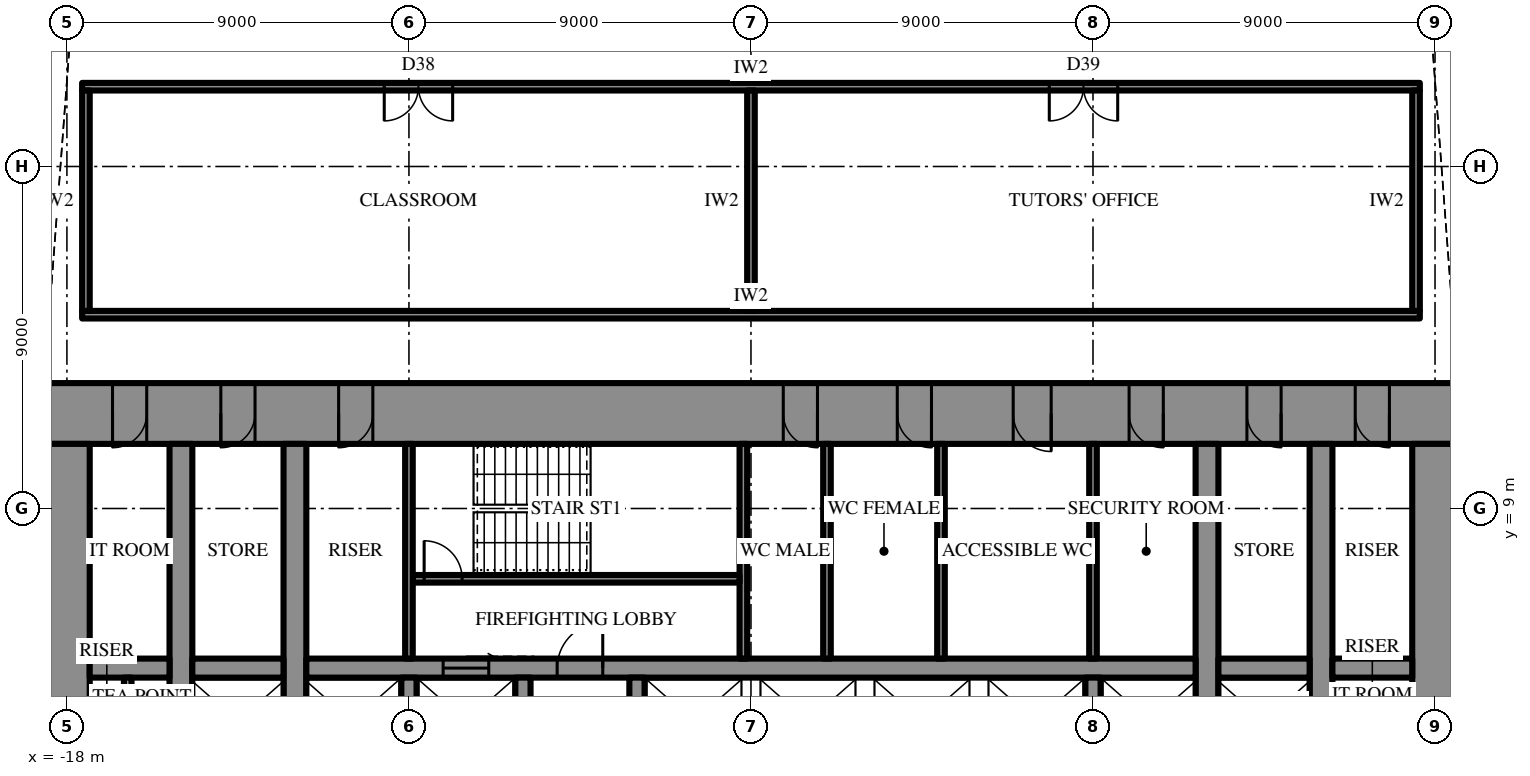
"""IFC4 building model, lengths in metres.
Left out: names, types, materials, properties, quantities, classifications, styles, units other than length and angle.
Written with IfcOpenShell. Run it as: python <this file> out.ifc"""

import sys

from ifc_helpers import new_model, si_unit, direction, frame, frame_2d, origin, place, context, subcontext, project, spatial, rectangle, extrude, element, fill, save


model = new_model("IFC4")
c1 = context("Model", 3, precision=1e-05, world=origin(), true_north=direction((0.0, 1.0)))
c2 = subcontext(c1, "Body", "Model", "MODEL_VIEW")
j1 = project(units=[si_unit("LENGTHUNIT", "METRE"), si_unit("PLANEANGLEUNIT", "RADIAN")], contexts=[c1])
p1 = place(None, origin())
s1 = spatial("IfcSite", under=j1, at=p1, CompositionType="ELEMENT")
p2 = place(p1, origin())
s2 = spatial("IfcBuilding", under=s1, at=p2, CompositionType="ELEMENT")
p3 = place(p2, frame((0.0, 0.0, 119.5)))
s3 = spatial("IfcBuildingStorey", under=s2, at=p3, CompositionType="ELEMENT", Elevation=119.5)
p4 = place(p3, frame((-18.6, 11.5, 0.0), z_axis=(0.0, 0.0, 1.0), x_axis=(1.0, 0.0, 0.0)))
e1 = element("IfcWall", 1, at=p4, inside=s3, PredefinedType="SHEAR", context=c2, shape_type="SweptSolid", body=[
    extrude(rectangle(XDim=37.2, YDim=1.6, at=frame_2d((18.6, 0.0))), origin(), (0.0, 0.0, 1.0), 4.2),
])
p5 = place(p4, frame((19.45, 0.0, 0.0)))
e2 = element("IfcOpeningElement", 2, at=p5, cuts=e1, PredefinedType="OPENING", context=c2, shape_type="SweptSolid", body=[
    extrude(rectangle(XDim=0.9, YDim=2.2, at=frame_2d((0.45, 1.1))), frame((0.0, 0.81, 0.0), z_axis=(0.0, -1.0, 0.0), x_axis=(1.0, 0.0, 0.0)), (0.0, 0.0, 1.0), 1.62),
])
p6 = place(p4, frame((22.45, 0.0, 0.0)))
e3 = element("IfcOpeningElement", 3, at=p6, cuts=e1, PredefinedType="OPENING", context=c2, shape_type="SweptSolid", body=[
    extrude(rectangle(XDim=0.9, YDim=2.2, at=frame_2d((0.45, 1.1))), frame((0.0, 0.81, 0.0), z_axis=(0.0, -1.0, 0.0), x_axis=(1.0, 0.0, 0.0)), (0.0, 0.0, 1.0), 1.62),
])
p7 = place(p4, frame((25.5, 0.0, 0.0)))
e4 = element("IfcOpeningElement", 4, at=p7, cuts=e1, PredefinedType="OPENING", context=c2, shape_type="SweptSolid", body=[
    extrude(rectangle(XDim=1.0, YDim=2.2, at=frame_2d((0.5, 1.1))), frame((0.0, 0.81, 0.0), z_axis=(0.0, -1.0, 0.0), x_axis=(1.0, 0.0, 0.0)), (0.0, 0.0, 1.0), 1.62),
])
p8 = place(p4, frame((1.8, 0.0, 0.0)))
e5 = element("IfcOpeningElement", 5, at=p8, cuts=e1, PredefinedType="OPENING", context=c2, shape_type="SweptSolid", body=[
    extrude(rectangle(XDim=0.9, YDim=2.2, at=frame_2d((0.45, 1.1))), frame((0.0, 0.81, 0.0), z_axis=(0.0, -1.0, 0.0), x_axis=(1.0, 0.0, 0.0)), (0.0, 0.0, 1.0), 1.62),
])
p9 = place(p4, frame((4.65, 0.0, 0.0)))
e6 = element("IfcOpeningElement", 6, at=p9, cuts=e1, PredefinedType="OPENING", context=c2, shape_type="SweptSolid", body=[
    extrude(rectangle(XDim=0.9, YDim=2.2, at=frame_2d((0.45, 1.1))), frame((0.0, 0.81, 0.0), z_axis=(0.0, -1.0, 0.0), x_axis=(1.0, 0.0, 0.0)), (0.0, 0.0, 1.0), 1.62),
])
p10 = place(p4, frame((7.75, 0.0, 0.0)))
e7 = element("IfcOpeningElement", 7, at=p10, cuts=e1, PredefinedType="OPENING", context=c2, shape_type="SweptSolid", body=[
    extrude(rectangle(XDim=0.9, YDim=2.2, at=frame_2d((0.45, 1.1))), frame((0.0, 0.81, 0.0), z_axis=(0.0, -1.0, 0.0), x_axis=(1.0, 0.0, 0.0)), (0.0, 0.0, 1.0), 1.62),
])
p11 = place(p4, frame((28.55, 0.0, 0.0)))
e8 = element("IfcOpeningElement", 8, at=p11, cuts=e1, PredefinedType="OPENING", context=c2, shape_type="SweptSolid", body=[
    extrude(rectangle(XDim=0.9, YDim=2.2, at=frame_2d((0.45, 1.1))), frame((0.0, 0.81, 0.0), z_axis=(0.0, -1.0, 0.0), x_axis=(1.0, 0.0, 0.0)), (0.0, 0.0, 1.0), 1.62),
])
p12 = place(p4, frame((31.65, 0.0, 0.0)))
e9 = element("IfcOpeningElement", 9, at=p12, cuts=e1, PredefinedType="OPENING", context=c2, shape_type="SweptSolid", body=[
    extrude(rectangle(XDim=0.9, YDim=2.2, at=frame_2d((0.45, 1.1))), frame((0.0, 0.81, 0.0), z_axis=(0.0, -1.0, 0.0), x_axis=(1.0, 0.0, 0.0)), (0.0, 0.0, 1.0), 1.62),
])
p13 = place(p4, frame((34.5, 0.0, 0.0)))
e10 = element("IfcOpeningElement", 10, at=p13, cuts=e1, PredefinedType="OPENING", context=c2, shape_type="SweptSolid", body=[
    extrude(rectangle(XDim=0.9, YDim=2.2, at=frame_2d((0.45, 1.1))), frame((0.0, 0.81, 0.0), z_axis=(0.0, -1.0, 0.0), x_axis=(1.0, 0.0, 0.0)), (0.0, 0.0, 1.0), 1.62),
])
p14 = place(p3, frame((18.0, -10.7, 0.0), z_axis=(0.0, 0.0, 1.0), x_axis=(0.0, 1.0, 0.0)))
e11 = element("IfcWall", 11, at=p14, inside=s3, PredefinedType="SHEAR", context=c2, shape_type="SweptSolid", body=[
    extrude(rectangle(XDim=21.4, YDim=1.2, at=frame_2d((10.7, 0.0))), origin(), (0.0, 0.0, 1.0), 4.2),
])
p15 = place(p14, frame((9.8, 0.0, 0.0)))
e12 = element("IfcOpeningElement", 12, at=p15, cuts=e11, PredefinedType="OPENING", context=c2, shape_type="SweptSolid", body=[
    extrude(rectangle(XDim=1.8, YDim=2.4, at=frame_2d((0.9, 1.2))), frame((0.0, 0.61, 0.0), z_axis=(0.0, -1.0, 0.0), x_axis=(1.0, 0.0, 0.0)), (0.0, 0.0, 1.0), 1.22),
])
p16 = place(p3, frame((-18.0, 10.7, 0.0), z_axis=(0.0, 0.0, 1.0), x_axis=(0.0, -1.0, 0.0)))
e13 = element("IfcWall", 13, at=p16, inside=s3, PredefinedType="SHEAR", context=c2, shape_type="SweptSolid", body=[
    extrude(rectangle(XDim=21.4, YDim=1.2, at=frame_2d((10.7, 0.0))), origin(), (0.0, 0.0, 1.0), 4.2),
])
p17 = place(p16, frame((9.8, 0.0, 0.0)))
e14 = element("IfcOpeningElement", 14, at=p17, cuts=e13, PredefinedType="OPENING", context=c2, shape_type="SweptSolid", body=[
    extrude(rectangle(XDim=1.8, YDim=2.4, at=frame_2d((0.9, 1.2))), frame((0.0, 0.61, 0.0), z_axis=(0.0, -1.0, 0.0), x_axis=(1.0, 0.0, 0.0)), (0.0, 0.0, 1.0), 1.22),
])
p18 = place(p3, frame((12.0, -10.7, 0.0), z_axis=(0.0, 0.0, 1.0), x_axis=(0.0, 1.0, 0.0)))
e15 = element("IfcWall", 15, at=p18, inside=s3, PredefinedType="SHEAR", context=c2, shape_type="SweptSolid", body=[
    extrude(rectangle(XDim=21.4, YDim=0.6, at=frame_2d((10.7, 0.0))), origin(), (0.0, 0.0, 1.0), 4.2),
])
p19 = place(p18, frame((9.8, 0.0, 0.0)))
e16 = element("IfcOpeningElement", 16, at=p19, cuts=e15, PredefinedType="OPENING", context=c2, shape_type="SweptSolid", body=[
    extrude(rectangle(XDim=1.8, YDim=2.4, at=frame_2d((0.9, 1.2))), frame((0.0, 0.31, 0.0), z_axis=(0.0, -1.0, 0.0), x_axis=(1.0, 0.0, 0.0)), (0.0, 0.0, 1.0), 0.62),
])
p20 = place(p3, frame((-12.0, -10.7, 0.0), z_axis=(0.0, 0.0, 1.0), x_axis=(0.0, 1.0, 0.0)))
e17 = element("IfcWall", 17, at=p20, inside=s3, PredefinedType="SHEAR", context=c2, shape_type="SweptSolid", body=[
    extrude(rectangle(XDim=21.4, YDim=0.6, at=frame_2d((10.7, 0.0))), origin(), (0.0, 0.0, 1.0), 4.2),
])
p21 = place(p20, frame((9.8, 0.0, 0.0)))
e18 = element("IfcOpeningElement", 18, at=p21, cuts=e17, PredefinedType="OPENING", context=c2, shape_type="SweptSolid", body=[
    extrude(rectangle(XDim=1.8, YDim=2.4, at=frame_2d((0.9, 1.2))), frame((0.0, 0.31, 0.0), z_axis=(0.0, -1.0, 0.0), x_axis=(1.0, 0.0, 0.0)), (0.0, 0.0, 1.0), 0.62),
])
p22 = place(p3, frame((15.0, -10.7, 0.0), z_axis=(0.0, 0.0, 1.0), x_axis=(0.0, 1.0, 0.0)))
e19 = element("IfcWall", 19, at=p22, inside=s3, PredefinedType="SHEAR", context=c2, shape_type="SweptSolid", body=[
    extrude(rectangle(XDim=21.4, YDim=0.6, at=frame_2d((10.7, 0.0))), origin(), (0.0, 0.0, 1.0), 4.2),
])
p23 = place(p22, frame((9.8, 0.0, 0.0)))
e20 = element("IfcOpeningElement", 20, at=p23, cuts=e19, PredefinedType="OPENING", context=c2, shape_type="SweptSolid", body=[
    extrude(rectangle(XDim=1.8, YDim=2.4, at=frame_2d((0.9, 1.2))), frame((0.0, 0.31, 0.0), z_axis=(0.0, -1.0, 0.0), x_axis=(1.0, 0.0, 0.0)), (0.0, 0.0, 1.0), 0.62),
])
p24 = place(p3, frame((-15.0, -10.7, 0.0), z_axis=(0.0, 0.0, 1.0), x_axis=(0.0, 1.0, 0.0)))
e21 = element("IfcWall", 21, at=p24, inside=s3, PredefinedType="SHEAR", context=c2, shape_type="SweptSolid", body=[
    extrude(rectangle(XDim=21.4, YDim=0.6, at=frame_2d((10.7, 0.0))), origin(), (0.0, 0.0, 1.0), 4.2),
])
p25 = place(p24, frame((9.8, 0.0, 0.0)))
e22 = element("IfcOpeningElement", 22, at=p25, cuts=e21, PredefinedType="OPENING", context=c2, shape_type="SweptSolid", body=[
    extrude(rectangle(XDim=1.8, YDim=2.4, at=frame_2d((0.9, 1.2))), frame((0.0, 0.31, 0.0), z_axis=(0.0, -1.0, 0.0), x_axis=(1.0, 0.0, 0.0)), (0.0, 0.0, 1.0), 0.62),
])
p26 = place(p3, frame((-17.4, 4.8, 0.0), z_axis=(0.0, 0.0, 1.0), x_axis=(1.0, 0.0, 0.0)))
e23 = element("IfcWall", 23, at=p26, inside=s3, PredefinedType="SHEAR", context=c2, shape_type="SweptSolid", body=[
    extrude(rectangle(XDim=2.1, YDim=0.5, at=frame_2d((1.05, 0.0))), origin(), (0.0, 0.0, 1.0), 4.2),
])
p27 = place(p3, frame((-14.7, 4.8, 0.0), z_axis=(0.0, 0.0, 1.0), x_axis=(1.0, 0.0, 0.0)))
e24 = element("IfcWall", 24, at=p27, inside=s3, PredefinedType="SHEAR", context=c2, shape_type="SweptSolid", body=[
    extrude(rectangle(XDim=2.4, YDim=0.5, at=frame_2d((1.2, 0.0))), origin(), (0.0, 0.0, 1.0), 4.2),
])
p28 = place(p3, frame((-11.7, 4.8, 0.0), z_axis=(0.0, 0.0, 1.0), x_axis=(1.0, 0.0, 0.0)))
e25 = element("IfcWall", 25, at=p28, inside=s3, PredefinedType="SHEAR", context=c2, shape_type="SweptSolid", body=[
    extrude(rectangle(XDim=23.4, YDim=0.5, at=frame_2d((11.7, 0.0))), origin(), (0.0, 0.0, 1.0), 4.2),
])
p29 = place(p28, frame((6.6, 0.0, 0.0)))
e26 = element("IfcOpeningElement", 26, at=p29, cuts=e25, PredefinedType="OPENING", context=c2, shape_type="SweptSolid", body=[
    extrude(rectangle(XDim=1.2, YDim=2.2, at=frame_2d((0.6, 1.1))), frame((0.0, 0.26, 0.0), z_axis=(0.0, -1.0, 0.0), x_axis=(1.0, 0.0, 0.0)), (0.0, 0.0, 1.0), 0.52),
])
p30 = place(p28, frame((3.6, 0.0, 0.0)))
e27 = element("IfcOpeningElement", 27, at=p30, cuts=e25, PredefinedType="OPENING", context=c2, shape_type="SweptSolid", body=[
    extrude(rectangle(XDim=1.2, YDim=2.2, at=frame_2d((0.6, 1.1))), frame((0.0, 0.26, 0.0), z_axis=(0.0, -1.0, 0.0), x_axis=(1.0, 0.0, 0.0)), (0.0, 0.0, 1.0), 0.52),
])
p31 = place(p3, frame((12.3, 4.8, 0.0), z_axis=(0.0, 0.0, 1.0), x_axis=(1.0, 0.0, 0.0)))
e28 = element("IfcWall", 28, at=p31, inside=s3, PredefinedType="SHEAR", context=c2, shape_type="SweptSolid", body=[
    extrude(rectangle(XDim=2.4, YDim=0.5, at=frame_2d((1.2, 0.0))), origin(), (0.0, 0.0, 1.0), 4.2),
])
p32 = place(p3, frame((15.3, 4.8, 0.0), z_axis=(0.0, 0.0, 1.0), x_axis=(1.0, 0.0, 0.0)))
e29 = element("IfcWall", 29, at=p32, inside=s3, PredefinedType="SHEAR", context=c2, shape_type="SweptSolid", body=[
    extrude(rectangle(XDim=2.1, YDim=0.5, at=frame_2d((1.05, 0.0))), origin(), (0.0, 0.0, 1.0), 4.2),
])
for number, where, z_axis, x_axis in (
    (30, (-9.0, 2.25, 0.0), (0.0, 0.0, 1.0), (0.0, 1.0, 0.0)),
    (31, (-6.0, 2.25, 0.0), (0.0, 0.0, 1.0), (0.0, 1.0, 0.0)),
    (32, (-3.0, 2.25, 0.0), (0.0, 0.0, 1.0), (0.0, 1.0, 0.0)),
    (33, (9.0, 2.25, 0.0), (0.0, 0.0, 1.0), (0.0, 1.0, 0.0)),
):
    element("IfcWall", number, at=place(p3, frame(where, z_axis=z_axis, x_axis=x_axis)), inside=s3, PredefinedType="SHEAR", context=c2, shape_type="SweptSolid", body=[
        extrude(rectangle(XDim=2.3, YDim=0.4, at=frame_2d((1.15, 0.0))), origin(), (0.0, 0.0, 1.0), 4.2),
    ])
p33 = place(p3, frame((-0.2, 5.05, 0.0), z_axis=(0.0, 0.0, 1.0), x_axis=(0.0, 1.0, 0.0)))
e34 = element("IfcWall", 34, at=p33, inside=s3, PredefinedType="SHEAR", context=c2, shape_type="SweptSolid", body=[
    extrude(rectangle(XDim=5.65, YDim=0.2, at=frame_2d((2.825, 0.0))), origin(), (0.0, 0.0, 1.0), 4.2),
])
p34 = place(p3, frame((-8.9, 7.15, 0.0), z_axis=(0.0, 0.0, 1.0), x_axis=(1.0, 0.0, 0.0)))
e35 = element("IfcWall", 35, at=p34, inside=s3, PredefinedType="SHEAR", context=c2, shape_type="SweptSolid", body=[
    extrude(rectangle(XDim=8.6, YDim=0.2, at=frame_2d((4.3, 0.0))), origin(), (0.0, 0.0, 1.0), 4.2),
])
p35 = place(p34, frame((0.3, 0.0, 0.0)))
e36 = element("IfcOpeningElement", 36, at=p35, cuts=e35, PredefinedType="OPENING", context=c2, shape_type="SweptSolid", body=[
    extrude(rectangle(XDim=1.0, YDim=2.2, at=frame_2d((0.5, 1.1))), frame((0.0, 0.11, 0.0), z_axis=(0.0, -1.0, 0.0), x_axis=(1.0, 0.0, 0.0)), (0.0, 0.0, 1.0), 0.22),
])
for number, where, z_axis, x_axis in (
    (37, (-9.0, 5.05, 0.0), (0.0, 0.0, 1.0), (0.0, 1.0, 0.0)),
    (38, (9.0, 5.05, 0.0), (0.0, 0.0, 1.0), (0.0, 1.0, 0.0)),
    (39, (2.0, 5.05, 0.0), (0.0, 0.0, 1.0), (0.0, 1.0, 0.0)),
    (40, (5.0, 5.05, 0.0), (0.0, 0.0, 1.0), (0.0, 1.0, 0.0)),
):
    element("IfcWall", number, at=place(p3, frame(where, z_axis=z_axis, x_axis=x_axis)), inside=s3, PredefinedType="PARTITIONING", context=c2, shape_type="SweptSolid", body=[
        extrude(rectangle(XDim=5.65, YDim=0.2, at=frame_2d((2.825, 0.0))), origin(), (0.0, 0.0, 1.0), 4.0),
    ])
p36 = place(p3, frame((-16.4, 3.55, 0.0), z_axis=(0.0, 0.0, 1.0), x_axis=(0.0, 1.0, 0.0)))
e41 = element("IfcWall", 41, at=p36, inside=s3, PredefinedType="PARTITIONING", context=c2, shape_type="SweptSolid", body=[
    extrude(rectangle(XDim=1.0, YDim=0.2, at=frame_2d((0.5, 0.0))), origin(), (0.0, 0.0, 1.0), 4.0),
])
p37 = place(p3, frame((-17.6, 14.1, 0.0), z_axis=(0.0, 0.0, 1.0), x_axis=(1.0, 0.0, 0.0)))
e42 = element("IfcWall", 42, at=p37, inside=s3, PredefinedType="PARTITIONING", context=c2, shape_type="SweptSolid", body=[
    extrude(rectangle(XDim=35.2, YDim=0.2, at=frame_2d((17.6, 0.0))), origin(), (0.0, 0.0, 1.0), 4.0),
])
p38 = place(p3, frame((-17.6, 20.1, 0.0), z_axis=(0.0, 0.0, 1.0), x_axis=(1.0, 0.0, 0.0)))
e43 = element("IfcWall", 43, at=p38, inside=s3, PredefinedType="PARTITIONING", context=c2, shape_type="SweptSolid", body=[
    extrude(rectangle(XDim=35.2, YDim=0.2, at=frame_2d((17.6, 0.0))), origin(), (0.0, 0.0, 1.0), 4.0),
])
p39 = place(p38, frame((7.95, 0.0, 0.0)))
e44 = element("IfcOpeningElement", 44, at=p39, cuts=e43, PredefinedType="OPENING", context=c2, shape_type="SweptSolid", body=[
    extrude(rectangle(XDim=1.8, YDim=2.4, at=frame_2d((0.9, 1.2))), frame((0.0, 0.11, 0.0), z_axis=(0.0, -1.0, 0.0), x_axis=(1.0, 0.0, 0.0)), (0.0, 0.0, 1.0), 0.22),
])
p40 = place(p38, frame((25.45, 0.0, 0.0)))
e45 = element("IfcOpeningElement", 45, at=p40, cuts=e43, PredefinedType="OPENING", context=c2, shape_type="SweptSolid", body=[
    extrude(rectangle(XDim=1.8, YDim=2.4, at=frame_2d((0.9, 1.2))), frame((0.0, 0.11, 0.0), z_axis=(0.0, -1.0, 0.0), x_axis=(1.0, 0.0, 0.0)), (0.0, 0.0, 1.0), 0.22),
])
p41 = place(p3, frame((-17.5, 14.2, 0.0), z_axis=(0.0, 0.0, 1.0), x_axis=(0.0, 1.0, 0.0)))
e46 = element("IfcWall", 46, at=p41, inside=s3, PredefinedType="PARTITIONING", context=c2, shape_type="SweptSolid", body=[
    extrude(rectangle(XDim=5.8, YDim=0.2, at=frame_2d((2.9, 0.0))), origin(), (0.0, 0.0, 1.0), 4.0),
])
p42 = place(p3, frame((0.0, 14.2, 0.0), z_axis=(0.0, 0.0, 1.0), x_axis=(0.0, 1.0, 0.0)))
e47 = element("IfcWall", 47, at=p42, inside=s3, PredefinedType="PARTITIONING", context=c2, shape_type="SweptSolid", body=[
    extrude(rectangle(XDim=5.8, YDim=0.2, at=frame_2d((2.9, 0.0))), origin(), (0.0, 0.0, 1.0), 2.992),
])
p43 = place(p3, frame((17.5, 14.2, 0.0), z_axis=(0.0, 0.0, 1.0), x_axis=(0.0, 1.0, 0.0)))
e48 = element("IfcWall", 48, at=p43, inside=s3, PredefinedType="PARTITIONING", context=c2, shape_type="SweptSolid", body=[
    extrude(rectangle(XDim=5.8, YDim=0.2, at=frame_2d((2.9, 0.0))), origin(), (0.0, 0.0, 1.0), 4.0),
])
p44 = place(p29, origin())
e49 = element("IfcDoor", 49, at=p44, inside=s3, OperationType="SINGLE_SWING_LEFT", PredefinedType="DOOR", context=c2, shape_type="SweptSolid", body=[
    extrude(rectangle(XDim=1.2, YDim=2.2, at=frame_2d((0.6, 1.1))), frame((0.0, 0.025, 0.0), z_axis=(0.0, -1.0, 0.0), x_axis=(1.0, 0.0, 0.0)), (0.0, 0.0, 1.0), 0.05),
])
fill(e26, e49)
p45 = place(p35, origin())
e50 = element("IfcDoor", 50, at=p45, inside=s3, OperationType="SINGLE_SWING_RIGHT", PredefinedType="DOOR", context=c2, shape_type="SweptSolid", body=[
    extrude(rectangle(XDim=1.0, YDim=2.2, at=frame_2d((0.5, 1.1))), frame((0.0, 0.025, 0.0), z_axis=(0.0, -1.0, 0.0), x_axis=(1.0, 0.0, 0.0)), (0.0, 0.0, 1.0), 0.05),
])
fill(e36, e50)
p46 = place(p5, frame((0.9, 0.0, 0.0), z_axis=(0.0, 0.0, 1.0), x_axis=(-1.0, 0.0, 0.0)))
e51 = element("IfcDoor", 51, at=p46, inside=s3, OperationType="SINGLE_SWING_RIGHT", PredefinedType="DOOR", context=c2, shape_type="SweptSolid", body=[
    extrude(rectangle(XDim=0.9, YDim=2.2, at=frame_2d((0.45, 1.1))), frame((0.0, 0.025, 0.0), z_axis=(0.0, -1.0, 0.0), x_axis=(1.0, 0.0, 0.0)), (0.0, 0.0, 1.0), 0.05),
])
fill(e2, e51)
p47 = place(p6, frame((0.9, 0.0, 0.0), z_axis=(0.0, 0.0, 1.0), x_axis=(-1.0, 0.0, 0.0)))
e52 = element("IfcDoor", 52, at=p47, inside=s3, OperationType="SINGLE_SWING_RIGHT", PredefinedType="DOOR", context=c2, shape_type="SweptSolid", body=[
    extrude(rectangle(XDim=0.9, YDim=2.2, at=frame_2d((0.45, 1.1))), frame((0.0, 0.025, 0.0), z_axis=(0.0, -1.0, 0.0), x_axis=(1.0, 0.0, 0.0)), (0.0, 0.0, 1.0), 0.05),
])
fill(e3, e52)
p48 = place(p7, frame((1.0, 0.0, 0.0), z_axis=(0.0, 0.0, 1.0), x_axis=(-1.0, 0.0, 0.0)))
e53 = element("IfcDoor", 53, at=p48, inside=s3, OperationType="SINGLE_SWING_RIGHT", PredefinedType="DOOR", context=c2, shape_type="SweptSolid", body=[
    extrude(rectangle(XDim=1.0, YDim=2.2, at=frame_2d((0.5, 1.1))), frame((0.0, 0.025, 0.0), z_axis=(0.0, -1.0, 0.0), x_axis=(1.0, 0.0, 0.0)), (0.0, 0.0, 1.0), 0.05),
])
fill(e4, e53)
p49 = place(p8, frame((0.9, 0.0, 0.0), z_axis=(0.0, 0.0, 1.0), x_axis=(-1.0, 0.0, 0.0)))
e54 = element("IfcDoor", 54, at=p49, inside=s3, OperationType="SINGLE_SWING_LEFT", PredefinedType="DOOR", context=c2, shape_type="SweptSolid", body=[
    extrude(rectangle(XDim=0.9, YDim=2.2, at=frame_2d((0.45, 1.1))), frame((0.0, 0.025, 0.0), z_axis=(0.0, -1.0, 0.0), x_axis=(1.0, 0.0, 0.0)), (0.0, 0.0, 1.0), 0.05),
])
fill(e5, e54)
p50 = place(p9, frame((0.9, 0.0, 0.0), z_axis=(0.0, 0.0, 1.0), x_axis=(-1.0, 0.0, 0.0)))
e55 = element("IfcDoor", 55, at=p50, inside=s3, OperationType="SINGLE_SWING_LEFT", PredefinedType="DOOR", context=c2, shape_type="SweptSolid", body=[
    extrude(rectangle(XDim=0.9, YDim=2.2, at=frame_2d((0.45, 1.1))), frame((0.0, 0.025, 0.0), z_axis=(0.0, -1.0, 0.0), x_axis=(1.0, 0.0, 0.0)), (0.0, 0.0, 1.0), 0.05),
])
fill(e6, e55)
p51 = place(p10, frame((0.9, 0.0, 0.0), z_axis=(0.0, 0.0, 1.0), x_axis=(-1.0, 0.0, 0.0)))
e56 = element("IfcDoor", 56, at=p51, inside=s3, OperationType="SINGLE_SWING_LEFT", PredefinedType="DOOR", context=c2, shape_type="SweptSolid", body=[
    extrude(rectangle(XDim=0.9, YDim=2.2, at=frame_2d((0.45, 1.1))), frame((0.0, 0.025, 0.0), z_axis=(0.0, -1.0, 0.0), x_axis=(1.0, 0.0, 0.0)), (0.0, 0.0, 1.0), 0.05),
])
fill(e7, e56)
p52 = place(p11, frame((0.9, 0.0, 0.0), z_axis=(0.0, 0.0, 1.0), x_axis=(-1.0, 0.0, 0.0)))
e57 = element("IfcDoor", 57, at=p52, inside=s3, OperationType="SINGLE_SWING_RIGHT", PredefinedType="DOOR", context=c2, shape_type="SweptSolid", body=[
    extrude(rectangle(XDim=0.9, YDim=2.2, at=frame_2d((0.45, 1.1))), frame((0.0, 0.025, 0.0), z_axis=(0.0, -1.0, 0.0), x_axis=(1.0, 0.0, 0.0)), (0.0, 0.0, 1.0), 0.05),
])
fill(e8, e57)
p53 = place(p12, frame((0.9, 0.0, 0.0), z_axis=(0.0, 0.0, 1.0), x_axis=(-1.0, 0.0, 0.0)))
e58 = element("IfcDoor", 58, at=p53, inside=s3, OperationType="SINGLE_SWING_RIGHT", PredefinedType="DOOR", context=c2, shape_type="SweptSolid", body=[
    extrude(rectangle(XDim=0.9, YDim=2.2, at=frame_2d((0.45, 1.1))), frame((0.0, 0.025, 0.0), z_axis=(0.0, -1.0, 0.0), x_axis=(1.0, 0.0, 0.0)), (0.0, 0.0, 1.0), 0.05),
])
fill(e9, e58)
p54 = place(p13, frame((0.9, 0.0, 0.0), z_axis=(0.0, 0.0, 1.0), x_axis=(-1.0, 0.0, 0.0)))
e59 = element("IfcDoor", 59, at=p54, inside=s3, OperationType="SINGLE_SWING_RIGHT", PredefinedType="DOOR", context=c2, shape_type="SweptSolid", body=[
    extrude(rectangle(XDim=0.9, YDim=2.2, at=frame_2d((0.45, 1.1))), frame((0.0, 0.025, 0.0), z_axis=(0.0, -1.0, 0.0), x_axis=(1.0, 0.0, 0.0)), (0.0, 0.0, 1.0), 0.05),
])
fill(e10, e59)
p55 = place(p30, origin())
e60 = element("IfcDoor", 60, at=p55, inside=s3, OperationType="SLIDING_TO_LEFT", PredefinedType="DOOR", context=c2, shape_type="SweptSolid", body=[
    extrude(rectangle(XDim=1.2, YDim=2.2, at=frame_2d((0.6, 1.1))), frame((0.0, 0.025, 0.0), z_axis=(0.0, -1.0, 0.0), x_axis=(1.0, 0.0, 0.0)), (0.0, 0.0, 1.0), 0.05),
])
fill(e27, e60)
p56 = place(p39, frame((1.8, 0.0, 0.0), z_axis=(0.0, 0.0, 1.0), x_axis=(-1.0, 0.0, 0.0)))
e61 = element("IfcDoor", 61, at=p56, inside=s3, OperationType="DOUBLE_DOOR_SINGLE_SWING", PredefinedType="DOOR", context=c2, shape_type="SweptSolid", body=[
    extrude(rectangle(XDim=1.8, YDim=2.4, at=frame_2d((0.9, 1.2))), frame((0.0, 0.025, 0.0), z_axis=(0.0, -1.0, 0.0), x_axis=(1.0, 0.0, 0.0)), (0.0, 0.0, 1.0), 0.05),
])
fill(e44, e61)
p57 = place(p40, frame((1.8, 0.0, 0.0), z_axis=(0.0, 0.0, 1.0), x_axis=(-1.0, 0.0, 0.0)))
e62 = element("IfcDoor", 62, at=p57, inside=s3, OperationType="DOUBLE_DOOR_SINGLE_SWING", PredefinedType="DOOR", context=c2, shape_type="SweptSolid", body=[
    extrude(rectangle(XDim=1.8, YDim=2.4, at=frame_2d((0.9, 1.2))), frame((0.0, 0.025, 0.0), z_axis=(0.0, -1.0, 0.0), x_axis=(1.0, 0.0, 0.0)), (0.0, 0.0, 1.0), 0.05),
])
fill(e45, e62)
save(model, sys.argv[1])
